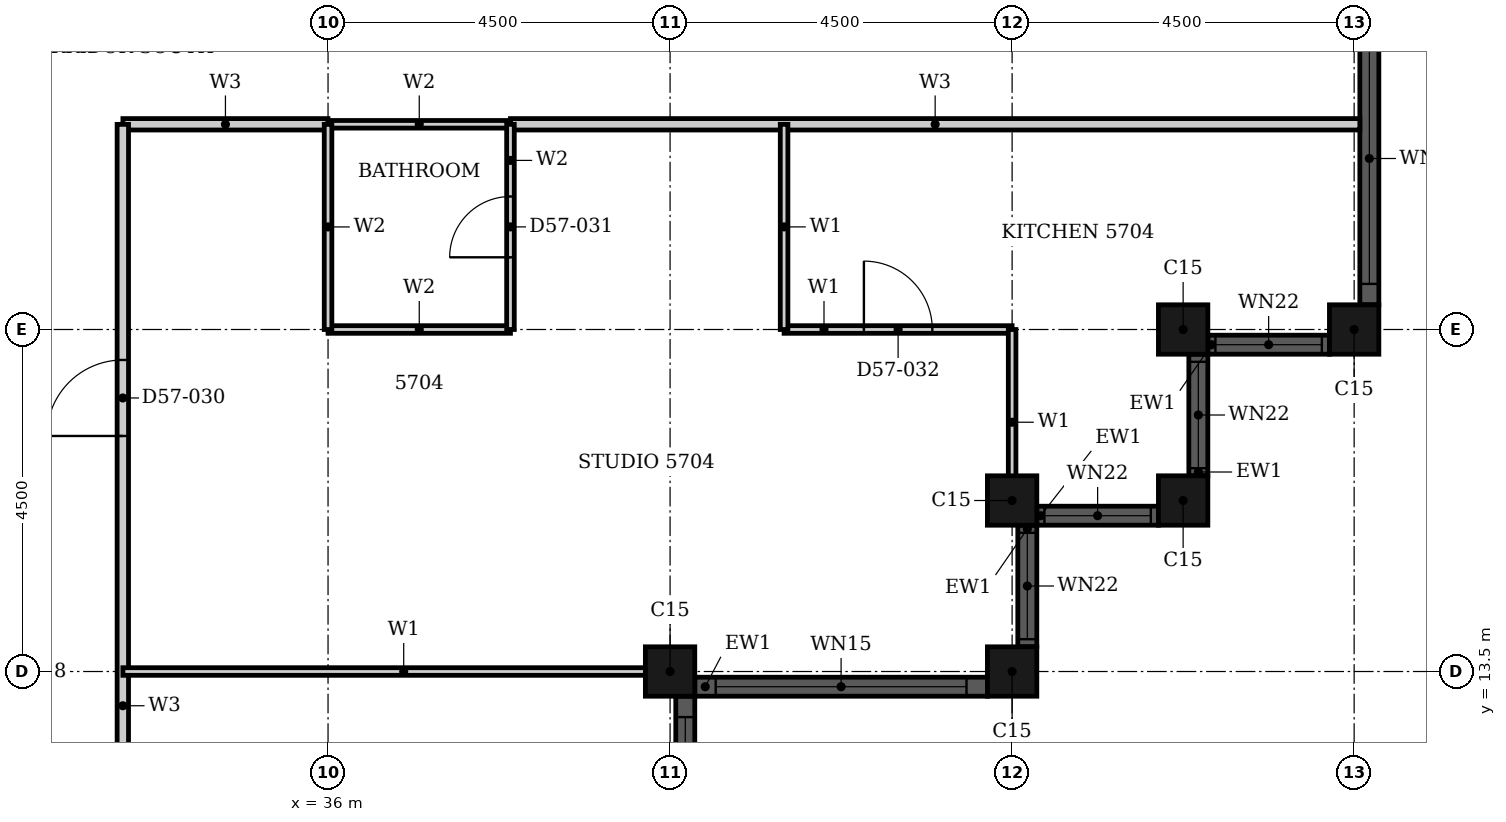
"""IFC4 building model, lengths in metres.
Left out: names, types, materials, properties, quantities, classifications, styles, units other than length and angle.
Written with IfcOpenShell. Run it as: python <this file> out.ifc"""

import sys

from ifc_helpers import new_model, si_unit, direction, frame, frame_2d, origin, origin_2d, place, context, subcontext, project, spatial, rectangle, hollow_rectangle, extrude, element, fill, save


model = new_model("IFC4")
c1 = context("Model", 3, precision=1e-05, world=origin(), true_north=direction((0.0, 1.0)))
c2 = subcontext(c1, "Body", "Model", "MODEL_VIEW")
j1 = project(units=[si_unit("LENGTHUNIT", "METRE"), si_unit("PLANEANGLEUNIT", "RADIAN")], contexts=[c1])
p1 = place(None, origin())
s1 = spatial("IfcSite", under=j1, at=p1, CompositionType="ELEMENT")
p2 = place(p1, origin())
s2 = spatial("IfcBuilding", under=s1, at=p2, CompositionType="ELEMENT")
p3 = place(p2, frame((0.0, 0.0, 225.7)))
s3 = spatial("IfcBuildingStorey", under=s2, at=p3, CompositionType="ELEMENT", Elevation=225.7)
for number, where, z_axis, x_axis in (
    (1, (40.5, 13.5, 0.0), (0.0, 0.0, 1.0), (1.0, 0.0, 0.0)),
    (2, (45.0, 13.5, 0.0), (0.0, 0.0, 1.0), (1.0, 0.0, 0.0)),
    (3, (45.0, 15.75, 0.0), (0.0, 0.0, 1.0), (1.0, 0.0, 0.0)),
    (4, (47.25, 15.75, 0.0), (0.0, 0.0, 1.0), (1.0, 0.0, 0.0)),
    (5, (47.25, 18.0, 0.0), (0.0, 0.0, 1.0), (1.0, 0.0, 0.0)),
    (6, (49.5, 18.0, 0.0), (0.0, 0.0, 1.0), (1.0, 0.0, 0.0)),
):
    element("IfcColumn", number, at=place(p3, frame(where, z_axis=z_axis, x_axis=x_axis)), inside=s3, PredefinedType="COLUMN", context=c2, shape_type="SweptSolid", body=[
        extrude(hollow_rectangle(XDim=0.65, YDim=0.65, WallThickness=0.021, at=origin_2d()), origin(), (0.0, 0.0, 1.0), 3.7),
    ])
p4 = place(p3, frame((40.825, 13.3, 0.0), z_axis=(0.0, 0.0, 1.0), x_axis=(1.0, 0.0, 0.0)))
e7 = element("IfcWall", 7, at=p4, inside=s3, PredefinedType="SOLIDWALL", context=c2, shape_type="SweptSolid", body=[
    extrude(rectangle(XDim=3.85, YDim=0.25, at=frame_2d((1.925, 0.0))), origin(), (0.0, 0.0, 1.0), 3.7),
])
p5 = place(p4, frame((0.275, 0.0, 0.45)))
e8 = element("IfcOpeningElement", 8, at=p5, cuts=e7, PredefinedType="OPENING", context=c2, shape_type="SweptSolid", body=[
    extrude(rectangle(XDim=3.3, YDim=2.3, at=frame_2d((1.65, 1.15))), frame((0.0, 0.135, 0.0), z_axis=(0.0, -1.0, 0.0), x_axis=(1.0, 0.0, 0.0)), (0.0, 0.0, 1.0), 0.27),
])
p6 = place(p3, frame((45.2, 13.825, 0.0), z_axis=(0.0, 0.0, 1.0), x_axis=(0.0, 1.0, 0.0)))
e9 = element("IfcWall", 9, at=p6, inside=s3, PredefinedType="SOLIDWALL", context=c2, shape_type="SweptSolid", body=[
    extrude(rectangle(XDim=1.6, YDim=0.25, at=frame_2d((0.8, 0.0))), origin(), (0.0, 0.0, 1.0), 3.7),
])
p7 = place(p6, frame((0.1, 0.0, 0.9)))
e10 = element("IfcOpeningElement", 10, at=p7, cuts=e9, PredefinedType="OPENING", context=c2, shape_type="SweptSolid", body=[
    extrude(rectangle(XDim=1.4, YDim=1.85, at=frame_2d((0.7, 0.925))), frame((0.0, 0.135, 0.0), z_axis=(0.0, -1.0, 0.0), x_axis=(1.0, 0.0, 0.0)), (0.0, 0.0, 1.0), 0.27),
])
p8 = place(p3, frame((45.325, 15.55, 0.0), z_axis=(0.0, 0.0, 1.0), x_axis=(1.0, 0.0, 0.0)))
e11 = element("IfcWall", 11, at=p8, inside=s3, PredefinedType="SOLIDWALL", context=c2, shape_type="SweptSolid", body=[
    extrude(rectangle(XDim=1.6, YDim=0.25, at=frame_2d((0.8, 0.0))), origin(), (0.0, 0.0, 1.0), 3.7),
])
p9 = place(p8, frame((0.1, 0.0, 0.9)))
e12 = element("IfcOpeningElement", 12, at=p9, cuts=e11, PredefinedType="OPENING", context=c2, shape_type="SweptSolid", body=[
    extrude(rectangle(XDim=1.4, YDim=1.85, at=frame_2d((0.7, 0.925))), frame((0.0, 0.135, 0.0), z_axis=(0.0, -1.0, 0.0), x_axis=(1.0, 0.0, 0.0)), (0.0, 0.0, 1.0), 0.27),
])
p10 = place(p3, frame((47.45, 16.075, 0.0), z_axis=(0.0, 0.0, 1.0), x_axis=(0.0, 1.0, 0.0)))
e13 = element("IfcWall", 13, at=p10, inside=s3, PredefinedType="SOLIDWALL", context=c2, shape_type="SweptSolid", body=[
    extrude(rectangle(XDim=1.6, YDim=0.25, at=frame_2d((0.8, 0.0))), origin(), (0.0, 0.0, 1.0), 3.7),
])
p11 = place(p10, frame((0.1, 0.0, 0.9)))
e14 = element("IfcOpeningElement", 14, at=p11, cuts=e13, PredefinedType="OPENING", context=c2, shape_type="SweptSolid", body=[
    extrude(rectangle(XDim=1.4, YDim=1.85, at=frame_2d((0.7, 0.925))), frame((0.0, 0.135, 0.0), z_axis=(0.0, -1.0, 0.0), x_axis=(1.0, 0.0, 0.0)), (0.0, 0.0, 1.0), 0.27),
])
p12 = place(p3, frame((47.575, 17.8, 0.0), z_axis=(0.0, 0.0, 1.0), x_axis=(1.0, 0.0, 0.0)))
e15 = element("IfcWall", 15, at=p12, inside=s3, PredefinedType="SOLIDWALL", context=c2, shape_type="SweptSolid", body=[
    extrude(rectangle(XDim=1.6, YDim=0.25, at=frame_2d((0.8, 0.0))), origin(), (0.0, 0.0, 1.0), 3.7),
])
p13 = place(p12, frame((0.1, 0.0, 0.9)))
e16 = element("IfcOpeningElement", 16, at=p13, cuts=e15, PredefinedType="OPENING", context=c2, shape_type="SweptSolid", body=[
    extrude(rectangle(XDim=1.4, YDim=1.85, at=frame_2d((0.7, 0.925))), frame((0.0, 0.135, 0.0), z_axis=(0.0, -1.0, 0.0), x_axis=(1.0, 0.0, 0.0)), (0.0, 0.0, 1.0), 0.27),
])
p14 = place(p3, frame((49.7, 18.325, 0.0), z_axis=(0.0, 0.0, 1.0), x_axis=(0.0, 1.0, 0.0)))
e17 = element("IfcWall", 17, at=p14, inside=s3, PredefinedType="SOLIDWALL", context=c2, shape_type="SweptSolid", body=[
    extrude(rectangle(XDim=8.35, YDim=0.25, at=frame_2d((4.175, 0.0))), origin(), (0.0, 0.0, 1.0), 3.7),
])
p15 = place(p14, frame((0.275, 0.0, 0.45)))
e18 = element("IfcOpeningElement", 18, at=p15, cuts=e17, PredefinedType="OPENING", context=c2, shape_type="SweptSolid", body=[
    extrude(rectangle(XDim=3.3, YDim=2.3, at=frame_2d((1.65, 1.15))), frame((0.0, 0.135, 0.0), z_axis=(0.0, -1.0, 0.0), x_axis=(1.0, 0.0, 0.0)), (0.0, 0.0, 1.0), 0.27),
])
p16 = place(p14, frame((4.775, 0.0, 0.45)))
e19 = element("IfcOpeningElement", 19, at=p16, cuts=e17, PredefinedType="OPENING", context=c2, shape_type="SweptSolid", body=[
    extrude(rectangle(XDim=3.3, YDim=2.3, at=frame_2d((1.65, 1.15))), frame((0.0, 0.135, 0.0), z_axis=(0.0, -1.0, 0.0), x_axis=(1.0, 0.0, 0.0)), (0.0, 0.0, 1.0), 0.27),
])
p17 = place(p3, frame((40.7, 4.825, 0.0), z_axis=(0.0, 0.0, 1.0), x_axis=(0.0, 1.0, 0.0)))
e20 = element("IfcWall", 20, at=p17, inside=s3, PredefinedType="SOLIDWALL", context=c2, shape_type="SweptSolid", body=[
    extrude(rectangle(XDim=8.35, YDim=0.25, at=frame_2d((4.175, 0.0))), origin(), (0.0, 0.0, 1.0), 3.7),
])
p18 = place(p17, frame((0.275, 0.0, 0.45)))
e21 = element("IfcOpeningElement", 21, at=p18, cuts=e20, PredefinedType="OPENING", context=c2, shape_type="SweptSolid", body=[
    extrude(rectangle(XDim=3.3, YDim=2.3, at=frame_2d((1.65, 1.15))), frame((0.0, 0.135, 0.0), z_axis=(0.0, -1.0, 0.0), x_axis=(1.0, 0.0, 0.0)), (0.0, 0.0, 1.0), 0.27),
])
p19 = place(p17, frame((4.775, 0.0, 0.45)))
e22 = element("IfcOpeningElement", 22, at=p19, cuts=e20, PredefinedType="OPENING", context=c2, shape_type="SweptSolid", body=[
    extrude(rectangle(XDim=3.3, YDim=2.3, at=frame_2d((1.65, 1.15))), frame((0.0, 0.135, 0.0), z_axis=(0.0, -1.0, 0.0), x_axis=(1.0, 0.0, 0.0)), (0.0, 0.0, 1.0), 0.27),
])
p20 = place(p3, frame((33.301, 20.7, 0.0), z_axis=(0.0, 0.0, 1.0), x_axis=(1.0, 0.0, 0.0)))
e23 = element("IfcWall", 23, at=p20, inside=s3, PredefinedType="PARTITIONING", context=c2, shape_type="SweptSolid", body=[
    extrude(rectangle(XDim=2.698, YDim=0.15, at=frame_2d((1.349, 0.0))), origin(), (0.0, 0.0, 1.0), 3.4),
])
p21 = place(p3, frame((38.4, 20.7, 0.0), z_axis=(0.0, 0.0, 1.0), x_axis=(1.0, 0.0, 0.0)))
e24 = element("IfcWall", 24, at=p21, inside=s3, PredefinedType="PARTITIONING", context=c2, shape_type="SweptSolid", body=[
    extrude(rectangle(XDim=11.175, YDim=0.15, at=frame_2d((5.587, 0.0))), origin(), (0.0, 0.0, 1.0), 3.4),
])
p22 = place(p3, frame((33.3, 4.5, 0.0), z_axis=(0.0, 0.0, 1.0), x_axis=(0.0, 1.0, 0.0)))
e25 = element("IfcWall", 25, at=p22, inside=s3, PredefinedType="PARTITIONING", context=c2, shape_type="SweptSolid", body=[
    extrude(rectangle(XDim=16.199, YDim=0.15, at=frame_2d((8.1, 0.0))), origin(), (0.0, 0.0, 1.0), 3.4),
])
p23 = place(p22, frame((12.099, 0.0, 0.0)))
e26 = element("IfcOpeningElement", 26, at=p23, cuts=e25, PredefinedType="OPENING", context=c2, shape_type="SweptSolid", body=[
    extrude(rectangle(XDim=1.0, YDim=2.2, at=frame_2d((0.5, 1.1))), frame((0.0, 0.085, 0.0), z_axis=(0.0, -1.0, 0.0), x_axis=(1.0, 0.0, 0.0)), (0.0, 0.0, 1.0), 0.17),
])
p24 = place(p22, frame((4.0, 0.0, 0.0)))
e27 = element("IfcOpeningElement", 27, at=p24, cuts=e25, PredefinedType="OPENING", context=c2, shape_type="SweptSolid", body=[
    extrude(rectangle(XDim=1.0, YDim=2.1, at=frame_2d((0.5, 1.05))), frame((0.0, 0.085, 0.0), z_axis=(0.0, -1.0, 0.0), x_axis=(1.0, 0.0, 0.0)), (0.0, 0.0, 1.0), 0.17),
])
p25 = place(p3, frame((33.301, 13.5, 0.0), z_axis=(0.0, 0.0, 1.0), x_axis=(1.0, 0.0, 0.0)))
e28 = element("IfcWall", 28, at=p25, inside=s3, PredefinedType="PARTITIONING", context=c2, shape_type="SweptSolid", body=[
    extrude(rectangle(XDim=7.389, YDim=0.1, at=frame_2d((3.694, 0.0))), origin(), (0.0, 0.0, 1.0), 2.48),
])
p26 = place(p3, frame((42.0, 18.0, 0.0), z_axis=(0.0, 0.0, 1.0), x_axis=(1.0, 0.0, 0.0)))
e29 = element("IfcWall", 29, at=p26, inside=s3, PredefinedType="PARTITIONING", context=c2, shape_type="SweptSolid", body=[
    extrude(rectangle(XDim=3.0, YDim=0.1, at=frame_2d((1.5, 0.0))), origin(), (0.0, 0.0, 1.0), 3.4),
])
p27 = place(p26, frame((1.05, 0.0, 0.0)))
e30 = element("IfcOpeningElement", 30, at=p27, cuts=e29, PredefinedType="OPENING", context=c2, shape_type="SweptSolid", body=[
    extrude(rectangle(XDim=0.9, YDim=2.1, at=frame_2d((0.45, 1.05))), frame((0.0, 0.06, 0.0), z_axis=(0.0, -1.0, 0.0), x_axis=(1.0, 0.0, 0.0)), (0.0, 0.0, 1.0), 0.12),
])
p28 = place(p3, frame((42.0, 18.0, 0.0), z_axis=(0.0, 0.0, 1.0), x_axis=(0.0, 1.0, 0.0)))
e31 = element("IfcWall", 31, at=p28, inside=s3, PredefinedType="PARTITIONING", context=c2, shape_type="SweptSolid", body=[
    extrude(rectangle(XDim=2.7, YDim=0.1, at=frame_2d((1.35, 0.0))), origin(), (0.0, 0.0, 1.0), 3.4),
])
p29 = place(p3, frame((45.0, 15.56, 0.0), z_axis=(0.0, 0.0, 1.0), x_axis=(0.0, 1.0, 0.0)))
e32 = element("IfcWall", 32, at=p29, inside=s3, PredefinedType="PARTITIONING", context=c2, shape_type="SweptSolid", body=[
    extrude(rectangle(XDim=2.44, YDim=0.1, at=frame_2d((1.22, 0.0))), origin(), (0.0, 0.0, 1.0), 3.4),
])
for number, where, z_axis, x_axis in (
    (33, (36.0, 18.0, 0.0), (0.0, 0.0, 1.0), (1.0, 0.0, 0.0)),
    (34, (36.0, 20.7, 0.0), (0.0, 0.0, 1.0), (1.0, 0.0, 0.0)),
):
    element("IfcWall", number, at=place(p3, frame(where, z_axis=z_axis, x_axis=x_axis)), inside=s3, PredefinedType="PARTITIONING", context=c2, shape_type="SweptSolid", body=[
        extrude(rectangle(XDim=2.4, YDim=0.1, at=frame_2d((1.2, 0.0))), origin(), (0.0, 0.0, 1.0), 3.4),
    ])
p30 = place(p3, frame((36.0, 18.0, 0.0), z_axis=(0.0, 0.0, 1.0), x_axis=(0.0, 1.0, 0.0)))
e35 = element("IfcWall", 35, at=p30, inside=s3, PredefinedType="PARTITIONING", context=c2, shape_type="SweptSolid", body=[
    extrude(rectangle(XDim=2.699, YDim=0.1, at=frame_2d((1.35, 0.0))), origin(), (0.0, 0.0, 1.0), 3.4),
])
p31 = place(p3, frame((38.4, 18.0, 0.0), z_axis=(0.0, 0.0, 1.0), x_axis=(0.0, 1.0, 0.0)))
e36 = element("IfcWall", 36, at=p31, inside=s3, PredefinedType="PARTITIONING", context=c2, shape_type="SweptSolid", body=[
    extrude(rectangle(XDim=2.7, YDim=0.1, at=frame_2d((1.35, 0.0))), origin(), (0.0, 0.0, 1.0), 3.4),
])
p32 = place(p31, frame((0.95, 0.0, 0.0)))
e37 = element("IfcOpeningElement", 37, at=p32, cuts=e36, PredefinedType="OPENING", context=c2, shape_type="SweptSolid", body=[
    extrude(rectangle(XDim=0.8, YDim=2.1, at=frame_2d((0.4, 1.05))), frame((0.0, 0.06, 0.0), z_axis=(0.0, -1.0, 0.0), x_axis=(1.0, 0.0, 0.0)), (0.0, 0.0, 1.0), 0.12),
])
p33 = place(p5, origin())
e38 = element("IfcWindow", 38, at=p33, inside=s3, PartitioningType="SINGLE_PANEL", PredefinedType="WINDOW", context=c2, shape_type="SweptSolid", body=[
    extrude(rectangle(XDim=3.3, YDim=2.3, at=frame_2d((1.65, 1.15))), frame((0.0, 0.03, 0.0), z_axis=(0.0, -1.0, 0.0), x_axis=(1.0, 0.0, 0.0)), (0.0, 0.0, 1.0), 0.06),
])
fill(e8, e38)
p34 = place(p7, origin())
e39 = element("IfcWindow", 39, at=p34, inside=s3, PartitioningType="SINGLE_PANEL", PredefinedType="WINDOW", context=c2, shape_type="SweptSolid", body=[
    extrude(rectangle(XDim=1.4, YDim=1.85, at=frame_2d((0.7, 0.925))), frame((0.0, 0.03, 0.0), z_axis=(0.0, -1.0, 0.0), x_axis=(1.0, 0.0, 0.0)), (0.0, 0.0, 1.0), 0.06),
])
fill(e10, e39)
p35 = place(p9, origin())
e40 = element("IfcWindow", 40, at=p35, inside=s3, PartitioningType="SINGLE_PANEL", PredefinedType="WINDOW", context=c2, shape_type="SweptSolid", body=[
    extrude(rectangle(XDim=1.4, YDim=1.85, at=frame_2d((0.7, 0.925))), frame((0.0, 0.03, 0.0), z_axis=(0.0, -1.0, 0.0), x_axis=(1.0, 0.0, 0.0)), (0.0, 0.0, 1.0), 0.06),
])
fill(e12, e40)
p36 = place(p11, origin())
e41 = element("IfcWindow", 41, at=p36, inside=s3, PartitioningType="SINGLE_PANEL", PredefinedType="WINDOW", context=c2, shape_type="SweptSolid", body=[
    extrude(rectangle(XDim=1.4, YDim=1.85, at=frame_2d((0.7, 0.925))), frame((0.0, 0.03, 0.0), z_axis=(0.0, -1.0, 0.0), x_axis=(1.0, 0.0, 0.0)), (0.0, 0.0, 1.0), 0.06),
])
fill(e14, e41)
p37 = place(p13, origin())
e42 = element("IfcWindow", 42, at=p37, inside=s3, PartitioningType="SINGLE_PANEL", PredefinedType="WINDOW", context=c2, shape_type="SweptSolid", body=[
    extrude(rectangle(XDim=1.4, YDim=1.85, at=frame_2d((0.7, 0.925))), frame((0.0, 0.03, 0.0), z_axis=(0.0, -1.0, 0.0), x_axis=(1.0, 0.0, 0.0)), (0.0, 0.0, 1.0), 0.06),
])
fill(e16, e42)
p38 = place(p15, origin())
e43 = element("IfcWindow", 43, at=p38, inside=s3, PartitioningType="SINGLE_PANEL", PredefinedType="WINDOW", context=c2, shape_type="SweptSolid", body=[
    extrude(rectangle(XDim=3.3, YDim=2.3, at=frame_2d((1.65, 1.15))), frame((0.0, 0.03, 0.0), z_axis=(0.0, -1.0, 0.0), x_axis=(1.0, 0.0, 0.0)), (0.0, 0.0, 1.0), 0.06),
])
fill(e18, e43)
p39 = place(p19, origin())
e44 = element("IfcWindow", 44, at=p39, inside=s3, PartitioningType="SINGLE_PANEL", PredefinedType="WINDOW", context=c2, shape_type="SweptSolid", body=[
    extrude(rectangle(XDim=3.3, YDim=2.3, at=frame_2d((1.65, 1.15))), frame((0.0, 0.03, 0.0), z_axis=(0.0, -1.0, 0.0), x_axis=(1.0, 0.0, 0.0)), (0.0, 0.0, 1.0), 0.06),
])
fill(e22, e44)
p40 = place(p23, origin())
e45 = element("IfcDoor", 45, at=p40, inside=s3, OperationType="SINGLE_SWING_RIGHT", PredefinedType="DOOR", context=c2, shape_type="SweptSolid", body=[
    extrude(rectangle(XDim=1.0, YDim=2.2, at=frame_2d((0.5, 1.1))), frame((0.0, 0.025, 0.0), z_axis=(0.0, -1.0, 0.0), x_axis=(1.0, 0.0, 0.0)), (0.0, 0.0, 1.0), 0.05),
])
fill(e26, e45)
p41 = place(p32, origin())
e46 = element("IfcDoor", 46, at=p41, inside=s3, OperationType="SINGLE_SWING_LEFT", PredefinedType="DOOR", context=c2, shape_type="SweptSolid", body=[
    extrude(rectangle(XDim=0.8, YDim=2.1, at=frame_2d((0.4, 1.05))), frame((0.0, 0.025, 0.0), z_axis=(0.0, -1.0, 0.0), x_axis=(1.0, 0.0, 0.0)), (0.0, 0.0, 1.0), 0.05),
])
fill(e37, e46)
p42 = place(p27, origin())
e47 = element("IfcDoor", 47, at=p42, inside=s3, OperationType="SINGLE_SWING_LEFT", PredefinedType="DOOR", context=c2, shape_type="SweptSolid", body=[
    extrude(rectangle(XDim=0.9, YDim=2.1, at=frame_2d((0.45, 1.05))), frame((0.0, 0.025, 0.0), z_axis=(0.0, -1.0, 0.0), x_axis=(1.0, 0.0, 0.0)), (0.0, 0.0, 1.0), 0.05),
])
fill(e30, e47)
save(model, sys.argv[1])
